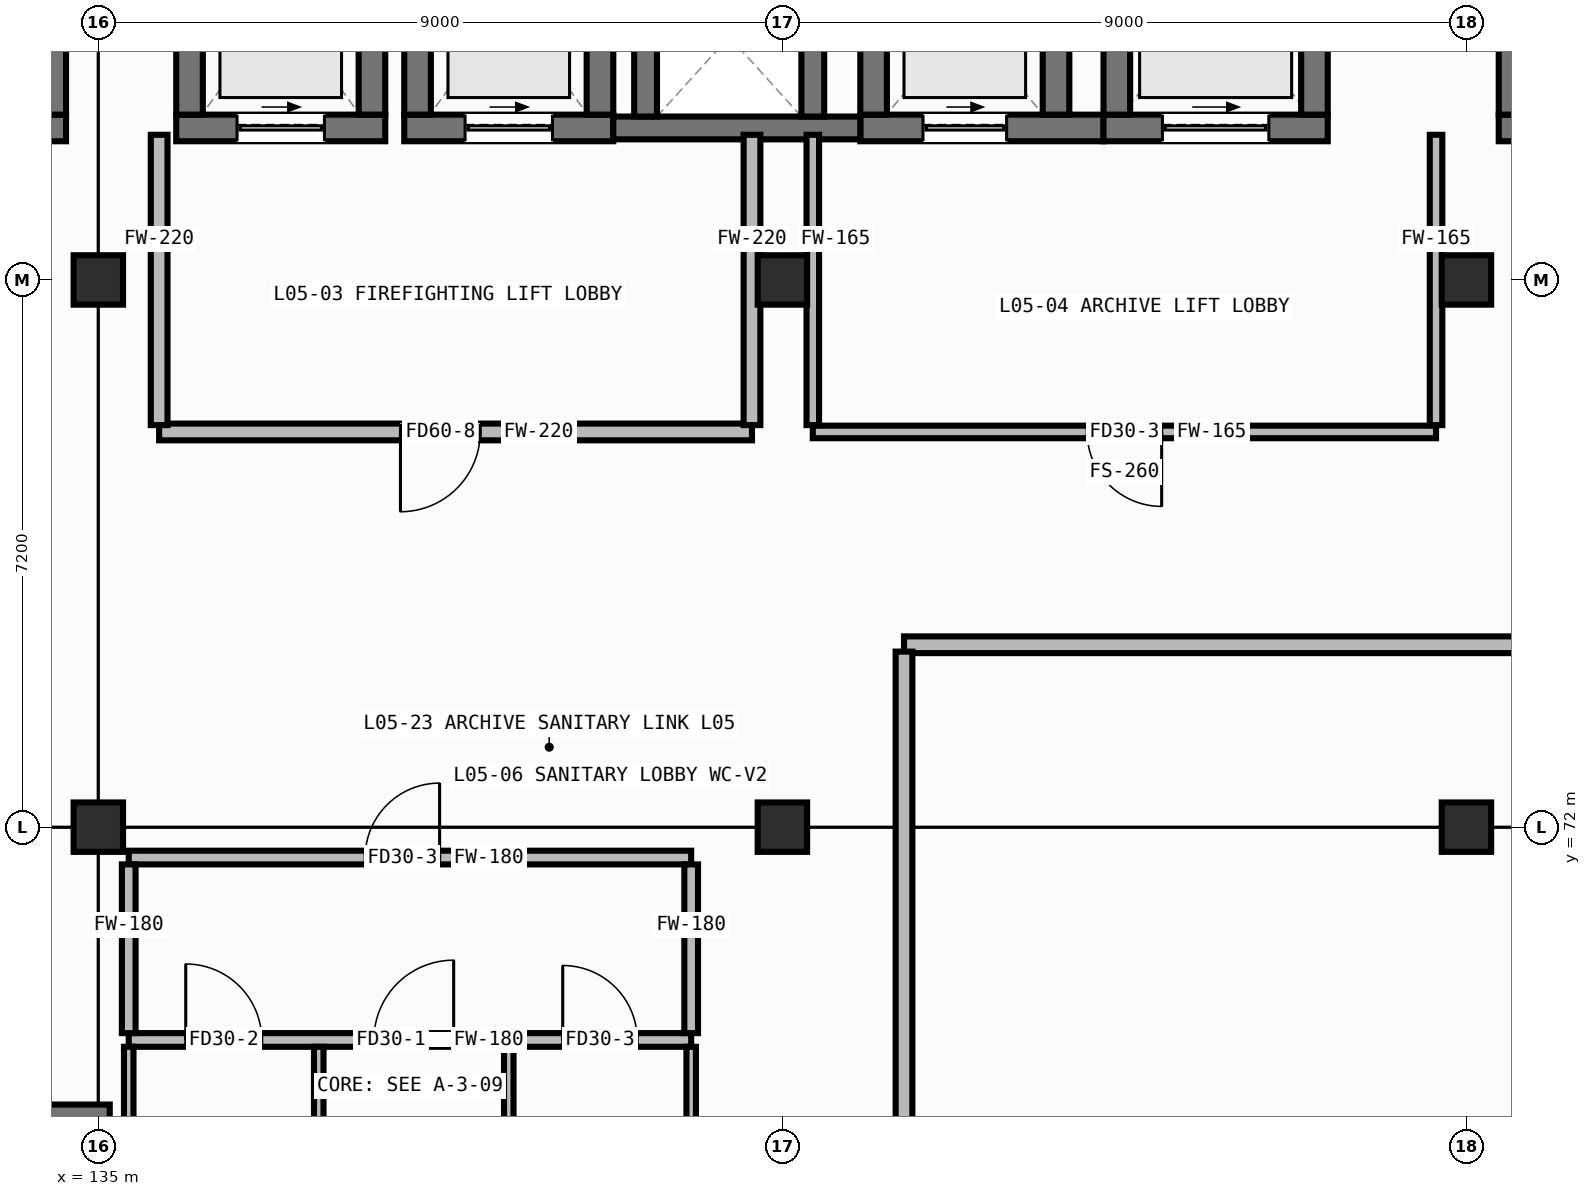
"""IFC4 building model, lengths in metres.
Left out: names, types, materials, properties, quantities, classifications, styles, units other than length and angle.
Written with IfcOpenShell. Run it as: python <this file> out.ifc"""

import sys

from ifc_helpers import new_model, si_unit, direction, frame, frame_2d, origin, origin_2d, place, context, subcontext, project, spatial, rectangle, hollow_rectangle, extrude, element, fill, save


model = new_model("IFC4")
c1 = context("Model", 3, precision=1e-05, world=origin(), true_north=direction((0.0, 1.0)))
c2 = subcontext(c1, "Body", "Model", "MODEL_VIEW")
j1 = project(units=[si_unit("LENGTHUNIT", "METRE"), si_unit("PLANEANGLEUNIT", "RADIAN")], contexts=[c1])
p1 = place(None, origin())
s1 = spatial("IfcSite", under=j1, at=p1, CompositionType="ELEMENT")
p2 = place(p1, origin())
s2 = spatial("IfcBuilding", under=s1, at=p2, CompositionType="ELEMENT")
p3 = place(p2, frame((0.0, 0.0, 17.0)))
s3 = spatial("IfcBuildingStorey", under=s2, at=p3, CompositionType="ELEMENT", Elevation=17.0)
for number, where, z_axis, x_axis in (
    (1, (135.0, 72.0, 0.0), (0.0, 0.0, 1.0), (1.0, 0.0, 0.0)),
    (2, (135.0, 79.2, 0.0), (0.0, 0.0, 1.0), (1.0, 0.0, 0.0)),
    (3, (144.0, 72.0, 0.0), (0.0, 0.0, 1.0), (1.0, 0.0, 0.0)),
    (4, (144.0, 79.2, 0.0), (0.0, 0.0, 1.0), (1.0, 0.0, 0.0)),
    (5, (153.0, 72.0, 0.0), (0.0, 0.0, 1.0), (1.0, 0.0, 0.0)),
    (6, (153.0, 79.2, 0.0), (0.0, 0.0, 1.0), (1.0, 0.0, 0.0)),
):
    element("IfcColumn", number, at=place(p3, frame(where, z_axis=z_axis, x_axis=x_axis)), inside=s3, PredefinedType="COLUMN", context=c2, shape_type="SweptSolid", body=[
        extrude(hollow_rectangle(XDim=0.65, YDim=0.65, WallThickness=0.025, at=origin_2d()), origin(), (0.0, 0.0, 1.0), 3.6),
    ])
p4 = place(p3, frame((126.425, 81.2, 0.0), z_axis=(0.0, 0.0, 1.0), x_axis=(1.0, 0.0, 0.0)))
e7 = element("IfcWall", 7, at=p4, inside=s3, PredefinedType="SHEAR", context=c2, shape_type="SweptSolid", body=[
    extrude(rectangle(XDim=8.15, YDim=0.35, at=frame_2d((4.075, 0.0))), origin(), (0.0, 0.0, 1.0), 3.34),
])
p5 = place(p4, frame((0.525, 0.0, 0.0)))
e8 = element("IfcOpeningElement", 8, at=p5, cuts=e7, PredefinedType="OPENING", context=c2, shape_type="SweptSolid", body=[
    extrude(rectangle(XDim=1.15, YDim=2.1, at=frame_2d((0.575, 1.05))), frame((0.0, 0.187, 0.0), z_axis=(0.0, -1.0, 0.0), x_axis=(1.0, 0.0, 0.0)), (0.0, 0.0, 1.0), 0.374),
])
p6 = place(p3, frame((134.4, 81.375, 0.0), z_axis=(0.0, 0.0, 1.0), x_axis=(0.0, 1.0, 0.0)))
e9 = element("IfcWall", 9, at=p6, inside=s3, PredefinedType="SHEAR", context=c2, shape_type="SweptSolid", body=[
    extrude(rectangle(XDim=3.55, YDim=0.35, at=frame_2d((1.775, 0.0))), origin(), (0.0, 0.0, 1.0), 3.34),
])
p7 = place(p3, frame((153.425, 81.2, 0.0), z_axis=(0.0, 0.0, 1.0), x_axis=(1.0, 0.0, 0.0)))
e10 = element("IfcWall", 10, at=p7, inside=s3, PredefinedType="SHEAR", context=c2, shape_type="SweptSolid", body=[
    extrude(rectangle(XDim=8.15, YDim=0.35, at=frame_2d((4.075, 0.0))), origin(), (0.0, 0.0, 1.0), 3.34),
])
p8 = place(p7, frame((0.525, 0.0, 0.0)))
e11 = element("IfcOpeningElement", 11, at=p8, cuts=e10, PredefinedType="OPENING", context=c2, shape_type="SweptSolid", body=[
    extrude(rectangle(XDim=1.15, YDim=2.1, at=frame_2d((0.575, 1.05))), frame((0.0, 0.187, 0.0), z_axis=(0.0, -1.0, 0.0), x_axis=(1.0, 0.0, 0.0)), (0.0, 0.0, 1.0), 0.374),
])
p9 = place(p3, frame((153.6, 81.375, 0.0), z_axis=(0.0, 0.0, 1.0), x_axis=(0.0, 1.0, 0.0)))
e12 = element("IfcWall", 12, at=p9, inside=s3, PredefinedType="SHEAR", context=c2, shape_type="SweptSolid", body=[
    extrude(rectangle(XDim=3.55, YDim=0.35, at=frame_2d((1.775, 0.0))), origin(), (0.0, 0.0, 1.0), 3.34),
])
p10 = place(p3, frame((136.025, 81.2, 0.0), z_axis=(0.0, 0.0, 1.0), x_axis=(1.0, 0.0, 0.0)))
e13 = element("IfcWall", 13, at=p10, inside=s3, PredefinedType="SHEAR", context=c2, shape_type="SweptSolid", body=[
    extrude(rectangle(XDim=2.75, YDim=0.35, at=frame_2d((1.375, 0.0))), origin(), (0.0, 0.0, 1.0), 3.34),
])
p11 = place(p10, frame((0.8, 0.0, 0.0)))
e14 = element("IfcOpeningElement", 14, at=p11, cuts=e13, PredefinedType="OPENING", context=c2, shape_type="SweptSolid", body=[
    extrude(rectangle(XDim=1.15, YDim=2.12, at=frame_2d((0.575, 1.06))), frame((0.0, 0.187, 0.0), z_axis=(0.0, -1.0, 0.0), x_axis=(1.0, 0.0, 0.0)), (0.0, 0.0, 1.0), 0.374),
])
for number, where, z_axis, x_axis in (
    (15, (136.2, 81.375, 0.0), (0.0, 0.0, 1.0), (0.0, 1.0, 0.0)),
    (16, (138.6, 81.375, 0.0), (0.0, 0.0, 1.0), (0.0, 1.0, 0.0)),
):
    element("IfcWall", number, at=place(p3, frame(where, z_axis=z_axis, x_axis=x_axis)), inside=s3, PredefinedType="SHEAR", context=c2, shape_type="SweptSolid", body=[
        extrude(rectangle(XDim=2.85, YDim=0.35, at=frame_2d((1.425, 0.0))), origin(), (0.0, 0.0, 1.0), 3.34),
    ])
p12 = place(p3, frame((139.025, 81.2, 0.0), z_axis=(0.0, 0.0, 1.0), x_axis=(1.0, 0.0, 0.0)))
e17 = element("IfcWall", 17, at=p12, inside=s3, PredefinedType="SHEAR", context=c2, shape_type="SweptSolid", body=[
    extrude(rectangle(XDim=2.75, YDim=0.35, at=frame_2d((1.375, 0.0))), origin(), (0.0, 0.0, 1.0), 3.34),
])
p13 = place(p12, frame((0.8, 0.0, 0.0)))
e18 = element("IfcOpeningElement", 18, at=p13, cuts=e17, PredefinedType="OPENING", context=c2, shape_type="SweptSolid", body=[
    extrude(rectangle(XDim=1.15, YDim=2.12, at=frame_2d((0.575, 1.06))), frame((0.0, 0.187, 0.0), z_axis=(0.0, -1.0, 0.0), x_axis=(1.0, 0.0, 0.0)), (0.0, 0.0, 1.0), 0.374),
])
for number, where, z_axis, x_axis in (
    (19, (139.2, 81.375, 0.0), (0.0, 0.0, 1.0), (0.0, 1.0, 0.0)),
    (20, (141.6, 81.375, 0.0), (0.0, 0.0, 1.0), (0.0, 1.0, 0.0)),
):
    element("IfcWall", number, at=place(p3, frame(where, z_axis=z_axis, x_axis=x_axis)), inside=s3, PredefinedType="SHEAR", context=c2, shape_type="SweptSolid", body=[
        extrude(rectangle(XDim=2.85, YDim=0.35, at=frame_2d((1.425, 0.0))), origin(), (0.0, 0.0, 1.0), 3.34),
    ])
p14 = place(p3, frame((145.025, 81.2, 0.0), z_axis=(0.0, 0.0, 1.0), x_axis=(1.0, 0.0, 0.0)))
e21 = element("IfcWall", 21, at=p14, inside=s3, PredefinedType="SHEAR", context=c2, shape_type="SweptSolid", body=[
    extrude(rectangle(XDim=3.2, YDim=0.35, at=frame_2d((1.6, 0.0))), origin(), (0.0, 0.0, 1.0), 3.34),
])
p15 = place(p14, frame((0.825, 0.0, 0.0)))
e22 = element("IfcOpeningElement", 22, at=p15, cuts=e21, PredefinedType="OPENING", context=c2, shape_type="SweptSolid", body=[
    extrude(rectangle(XDim=1.1, YDim=2.1, at=frame_2d((0.55, 1.05))), frame((0.0, 0.187, 0.0), z_axis=(0.0, -1.0, 0.0), x_axis=(1.0, 0.0, 0.0)), (0.0, 0.0, 1.0), 0.374),
])
for number, where, z_axis, x_axis in (
    (23, (145.2, 81.375, 0.0), (0.0, 0.0, 1.0), (0.0, 1.0, 0.0)),
    (24, (147.6, 81.375, 0.0), (0.0, 0.0, 1.0), (0.0, 1.0, 0.0)),
):
    element("IfcWall", number, at=place(p3, frame(where, z_axis=z_axis, x_axis=x_axis)), inside=s3, PredefinedType="SHEAR", context=c2, shape_type="SweptSolid", body=[
        extrude(rectangle(XDim=2.45, YDim=0.35, at=frame_2d((1.225, 0.0))), origin(), (0.0, 0.0, 1.0), 3.34),
    ])
p16 = place(p3, frame((148.225, 81.2, 0.0), z_axis=(0.0, 0.0, 1.0), x_axis=(1.0, 0.0, 0.0)))
e25 = element("IfcWall", 25, at=p16, inside=s3, PredefinedType="SHEAR", context=c2, shape_type="SweptSolid", body=[
    extrude(rectangle(XDim=2.95, YDim=0.35, at=frame_2d((1.475, 0.0))), origin(), (0.0, 0.0, 1.0), 3.34),
])
p17 = place(p16, frame((0.775, 0.0, 0.0)))
e26 = element("IfcOpeningElement", 26, at=p17, cuts=e25, PredefinedType="OPENING", context=c2, shape_type="SweptSolid", body=[
    extrude(rectangle(XDim=1.4, YDim=2.15, at=frame_2d((0.7, 1.075))), frame((0.0, 0.187, 0.0), z_axis=(0.0, -1.0, 0.0), x_axis=(1.0, 0.0, 0.0)), (0.0, 0.0, 1.0), 0.374),
])
for number, where, z_axis, x_axis in (
    (27, (148.4, 81.375, 0.0), (0.0, 0.0, 1.0), (0.0, 1.0, 0.0)),
    (28, (151.0, 81.375, 0.0), (0.0, 0.0, 1.0), (0.0, 1.0, 0.0)),
):
    element("IfcWall", number, at=place(p3, frame(where, z_axis=z_axis, x_axis=x_axis)), inside=s3, PredefinedType="SHEAR", context=c2, shape_type="SweptSolid", body=[
        extrude(rectangle(XDim=3.05, YDim=0.35, at=frame_2d((1.525, 0.0))), origin(), (0.0, 0.0, 1.0), 3.34),
    ])
p18 = place(p3, frame((141.775, 81.2, 0.0), z_axis=(0.0, 0.0, 1.0), x_axis=(1.0, 0.0, 0.0)))
e29 = element("IfcWall", 29, at=p18, inside=s3, PredefinedType="SHEAR", context=c2, shape_type="SweptSolid", body=[
    extrude(rectangle(XDim=3.25, YDim=0.3, at=frame_2d((1.625, 0.0))), origin(), (0.0, 0.0, 1.0), 3.34),
])
for number, where, z_axis, x_axis in (
    (30, (142.2, 81.35, 0.0), (0.0, 0.0, 1.0), (0.0, 1.0, 0.0)),
    (31, (144.4, 81.35, 0.0), (0.0, 0.0, 1.0), (0.0, 1.0, 0.0)),
    (32, (133.05, 68.2, 0.0), (0.0, 0.0, 1.0), (1.0, 0.0, 0.0)),
):
    element("IfcWall", number, at=place(p3, frame(where, z_axis=z_axis, x_axis=x_axis)), inside=s3, PredefinedType="SHEAR", context=c2, shape_type="SweptSolid", body=[
        extrude(rectangle(XDim=2.1, YDim=0.3, at=frame_2d((1.05, 0.0))), origin(), (0.0, 0.0, 1.0), 3.34),
    ])
p19 = place(p3, frame((135.8, 77.2, 0.0), z_axis=(0.0, 0.0, 1.0), x_axis=(1.0, 0.0, 0.0)))
e33 = element("IfcWall", 33, at=p19, inside=s3, PredefinedType="PARTITIONING", context=c2, shape_type="SweptSolid", body=[
    extrude(rectangle(XDim=7.8, YDim=0.22, at=frame_2d((3.9, 0.0))), origin(), (0.0, 0.0, 1.0), 3.34),
])
p20 = place(p19, frame((3.175, 0.0, 0.0)))
e34 = element("IfcOpeningElement", 34, at=p20, cuts=e33, PredefinedType="OPENING", context=c2, shape_type="SweptSolid", body=[
    extrude(rectangle(XDim=1.05, YDim=2.02, at=frame_2d((0.525, 1.01))), frame((0.0, 0.122, 0.0), z_axis=(0.0, -1.0, 0.0), x_axis=(1.0, 0.0, 0.0)), (0.0, 0.0, 1.0), 0.244),
])
for number, where, z_axis, x_axis in (
    (35, (135.8, 77.29, 0.0), (0.0, 0.0, 1.0), (0.0, 1.0, 0.0)),
    (36, (143.6, 77.29, 0.0), (0.0, 0.0, 1.0), (0.0, 1.0, 0.0)),
):
    element("IfcWall", number, at=place(p3, frame(where, z_axis=z_axis, x_axis=x_axis)), inside=s3, PredefinedType="PARTITIONING", context=c2, shape_type="SweptSolid", body=[
        extrude(rectangle(XDim=3.82, YDim=0.22, at=frame_2d((1.91, 0.0))), origin(), (0.0, 0.0, 1.0), 3.34),
    ])
p21 = place(p3, frame((144.4, 77.2, 0.0), z_axis=(0.0, 0.0, 1.0), x_axis=(1.0, 0.0, 0.0)))
e37 = element("IfcWall", 37, at=p21, inside=s3, PredefinedType="PARTITIONING", context=c2, shape_type="SweptSolid", body=[
    extrude(rectangle(XDim=8.2, YDim=0.165, at=frame_2d((4.1, 0.0))), origin(), (0.0, 0.0, 1.0), 3.34),
])
p22 = place(p21, frame((3.61, 0.0, 0.0)))
e38 = element("IfcOpeningElement", 38, at=p22, cuts=e37, PredefinedType="OPENING", context=c2, shape_type="SweptSolid", body=[
    extrude(rectangle(XDim=0.98, YDim=2.02, at=frame_2d((0.49, 1.01))), frame((0.0, 0.094, 0.0), z_axis=(0.0, -1.0, 0.0), x_axis=(1.0, 0.0, 0.0)), (0.0, 0.0, 1.0), 0.189),
])
for number, where, z_axis, x_axis in (
    (39, (144.4, 77.29, 0.0), (0.0, 0.0, 1.0), (0.0, 1.0, 0.0)),
    (40, (152.6, 77.29, 0.0), (0.0, 0.0, 1.0), (0.0, 1.0, 0.0)),
):
    element("IfcWall", number, at=place(p3, frame(where, z_axis=z_axis, x_axis=x_axis)), inside=s3, PredefinedType="PARTITIONING", context=c2, shape_type="SweptSolid", body=[
        extrude(rectangle(XDim=3.82, YDim=0.165, at=frame_2d((1.91, 0.0))), origin(), (0.0, 0.0, 1.0), 3.34),
    ])
p23 = place(p3, frame((135.4, 69.2, 0.0), z_axis=(0.0, 0.0, 1.0), x_axis=(1.0, 0.0, 0.0)))
e41 = element("IfcWall", 41, at=p23, inside=s3, PredefinedType="PARTITIONING", context=c2, shape_type="SweptSolid", body=[
    extrude(rectangle(XDim=7.4, YDim=0.18, at=frame_2d((3.7, 0.0))), origin(), (0.0, 0.0, 1.0), 3.34),
])
p24 = place(p23, frame((0.75, 0.0, 0.0)))
e42 = element("IfcOpeningElement", 42, at=p24, cuts=e41, PredefinedType="OPENING", context=c2, shape_type="SweptSolid", body=[
    extrude(rectangle(XDim=1.0, YDim=2.08, at=frame_2d((0.5, 1.04))), frame((0.0, 0.102, 0.0), z_axis=(0.0, -1.0, 0.0), x_axis=(1.0, 0.0, 0.0)), (0.0, 0.0, 1.0), 0.204),
])
p25 = place(p23, frame((3.225, 0.0, 0.0)))
e43 = element("IfcOpeningElement", 43, at=p25, cuts=e41, PredefinedType="OPENING", context=c2, shape_type="SweptSolid", body=[
    extrude(rectangle(XDim=1.05, YDim=2.1, at=frame_2d((0.525, 1.05))), frame((0.0, 0.102, 0.0), z_axis=(0.0, -1.0, 0.0), x_axis=(1.0, 0.0, 0.0)), (0.0, 0.0, 1.0), 0.204),
])
p26 = place(p23, frame((5.71, 0.0, 0.0)))
e44 = element("IfcOpeningElement", 44, at=p26, cuts=e41, PredefinedType="OPENING", context=c2, shape_type="SweptSolid", body=[
    extrude(rectangle(XDim=0.98, YDim=2.02, at=frame_2d((0.49, 1.01))), frame((0.0, 0.102, 0.0), z_axis=(0.0, -1.0, 0.0), x_axis=(1.0, 0.0, 0.0)), (0.0, 0.0, 1.0), 0.204),
])
p27 = place(p3, frame((135.4, 71.6, 0.0), z_axis=(0.0, 0.0, 1.0), x_axis=(1.0, 0.0, 0.0)))
e45 = element("IfcWall", 45, at=p27, inside=s3, PredefinedType="PARTITIONING", context=c2, shape_type="SweptSolid", body=[
    extrude(rectangle(XDim=7.4, YDim=0.18, at=frame_2d((3.7, 0.0))), origin(), (0.0, 0.0, 1.0), 3.34),
])
p28 = place(p27, frame((3.11, 0.0, 0.0)))
e46 = element("IfcOpeningElement", 46, at=p28, cuts=e45, PredefinedType="OPENING", context=c2, shape_type="SweptSolid", body=[
    extrude(rectangle(XDim=0.98, YDim=2.02, at=frame_2d((0.49, 1.01))), frame((0.0, 0.102, 0.0), z_axis=(0.0, -1.0, 0.0), x_axis=(1.0, 0.0, 0.0)), (0.0, 0.0, 1.0), 0.204),
])
for number, where, z_axis, x_axis in (
    (47, (135.4, 69.29, 0.0), (0.0, 0.0, 1.0), (0.0, 1.0, 0.0)),
    (48, (142.8, 69.29, 0.0), (0.0, 0.0, 1.0), (0.0, 1.0, 0.0)),
):
    element("IfcWall", number, at=place(p3, frame(where, z_axis=z_axis, x_axis=x_axis)), inside=s3, PredefinedType="PARTITIONING", context=c2, shape_type="SweptSolid", body=[
        extrude(rectangle(XDim=2.22, YDim=0.18, at=frame_2d((1.11, 0.0))), origin(), (0.0, 0.0, 1.0), 3.34),
    ])
for number, where, z_axis, x_axis in (
    (49, (135.4, 65.69, 0.0), (0.0, 0.0, 1.0), (0.0, 1.0, 0.0)),
    (50, (137.9, 65.69, 0.0), (0.0, 0.0, 1.0), (0.0, 1.0, 0.0)),
    (51, (140.4, 65.69, 0.0), (0.0, 0.0, 1.0), (0.0, 1.0, 0.0)),
    (52, (142.8, 65.69, 0.0), (0.0, 0.0, 1.0), (0.0, 1.0, 0.0)),
):
    element("IfcWall", number, at=place(p3, frame(where, z_axis=z_axis, x_axis=x_axis)), inside=s3, PredefinedType="PARTITIONING", context=c2, shape_type="SweptSolid", body=[
        extrude(rectangle(XDim=3.42, YDim=0.125, at=frame_2d((1.71, 0.0))), origin(), (0.0, 0.0, 1.0), 3.34),
    ])
p29 = place(p3, frame((145.6, 74.4, 0.0), z_axis=(0.0, 0.0, 1.0), x_axis=(1.0, 0.0, 0.0)))
e53 = element("IfcWall", 53, at=p29, inside=s3, PredefinedType="PARTITIONING", context=c2, shape_type="SweptSolid", body=[
    extrude(rectangle(XDim=16.255, YDim=0.22, at=frame_2d((8.127, 0.0))), origin(), (0.0, 0.0, 1.0), 3.34),
])
p30 = place(p3, frame((145.6, 50.435, 0.0), z_axis=(0.0, 0.0, 1.0), x_axis=(0.0, 1.0, 0.0)))
e54 = element("IfcWall", 54, at=p30, inside=s3, PredefinedType="PARTITIONING", context=c2, shape_type="SweptSolid", body=[
    extrude(rectangle(XDim=23.875, YDim=0.22, at=frame_2d((11.938, 0.0))), origin(), (0.0, 0.0, 1.0), 3.34),
])
p31 = place(p30, frame((15.165, 0.0, 0.0)))
e55 = element("IfcOpeningElement", 55, at=p31, cuts=e54, PredefinedType="OPENING", context=c2, shape_type="SweptSolid", body=[
    extrude(rectangle(XDim=1.6, YDim=2.12, at=frame_2d((0.8, 1.06))), frame((0.0, 0.122, 0.0), z_axis=(0.0, -1.0, 0.0), x_axis=(1.0, 0.0, 0.0)), (0.0, 0.0, 1.0), 0.244),
])
p32 = place(p11, origin())
e56 = element("IfcDoor", 56, at=p32, inside=s3, OperationType="SLIDING_TO_LEFT", PredefinedType="DOOR", context=c2, shape_type="SweptSolid", body=[
    extrude(rectangle(XDim=1.15, YDim=2.12, at=frame_2d((0.575, 1.06))), frame((0.0, 0.025, 0.0), z_axis=(0.0, -1.0, 0.0), x_axis=(1.0, 0.0, 0.0)), (0.0, 0.0, 1.0), 0.05),
])
fill(e14, e56)
p33 = place(p13, origin())
e57 = element("IfcDoor", 57, at=p33, inside=s3, OperationType="SLIDING_TO_LEFT", PredefinedType="DOOR", context=c2, shape_type="SweptSolid", body=[
    extrude(rectangle(XDim=1.15, YDim=2.12, at=frame_2d((0.575, 1.06))), frame((0.0, 0.025, 0.0), z_axis=(0.0, -1.0, 0.0), x_axis=(1.0, 0.0, 0.0)), (0.0, 0.0, 1.0), 0.05),
])
fill(e18, e57)
p34 = place(p15, origin())
e58 = element("IfcDoor", 58, at=p34, inside=s3, OperationType="SLIDING_TO_LEFT", PredefinedType="DOOR", context=c2, shape_type="SweptSolid", body=[
    extrude(rectangle(XDim=1.1, YDim=2.1, at=frame_2d((0.55, 1.05))), frame((0.0, 0.025, 0.0), z_axis=(0.0, -1.0, 0.0), x_axis=(1.0, 0.0, 0.0)), (0.0, 0.0, 1.0), 0.05),
])
fill(e22, e58)
p35 = place(p17, origin())
e59 = element("IfcDoor", 59, at=p35, inside=s3, OperationType="SLIDING_TO_LEFT", PredefinedType="DOOR", context=c2, shape_type="SweptSolid", body=[
    extrude(rectangle(XDim=1.4, YDim=2.15, at=frame_2d((0.7, 1.075))), frame((0.0, 0.025, 0.0), z_axis=(0.0, -1.0, 0.0), x_axis=(1.0, 0.0, 0.0)), (0.0, 0.0, 1.0), 0.05),
])
fill(e26, e59)
p36 = place(p20, frame((1.05, 0.0, 0.0), z_axis=(0.0, 0.0, 1.0), x_axis=(-1.0, 0.0, 0.0)))
e60 = element("IfcDoor", 60, at=p36, inside=s3, OperationType="SINGLE_SWING_RIGHT", PredefinedType="DOOR", context=c2, shape_type="SweptSolid", body=[
    extrude(rectangle(XDim=1.05, YDim=2.02, at=frame_2d((0.525, 1.01))), frame((0.0, 0.025, 0.0), z_axis=(0.0, -1.0, 0.0), x_axis=(1.0, 0.0, 0.0)), (0.0, 0.0, 1.0), 0.05),
])
fill(e34, e60)
p37 = place(p22, frame((0.98, 0.0, 0.0), z_axis=(0.0, 0.0, 1.0), x_axis=(-1.0, 0.0, 0.0)))
e61 = element("IfcDoor", 61, at=p37, inside=s3, OperationType="SINGLE_SWING_LEFT", PredefinedType="DOOR", context=c2, shape_type="SweptSolid", body=[
    extrude(rectangle(XDim=0.98, YDim=2.02, at=frame_2d((0.49, 1.01))), frame((0.0, 0.025, 0.0), z_axis=(0.0, -1.0, 0.0), x_axis=(1.0, 0.0, 0.0)), (0.0, 0.0, 1.0), 0.05),
])
fill(e38, e61)
p38 = place(p28, origin())
e62 = element("IfcDoor", 62, at=p38, inside=s3, OperationType="SINGLE_SWING_RIGHT", PredefinedType="DOOR", context=c2, shape_type="SweptSolid", body=[
    extrude(rectangle(XDim=0.98, YDim=2.02, at=frame_2d((0.49, 1.01))), frame((0.0, 0.025, 0.0), z_axis=(0.0, -1.0, 0.0), x_axis=(1.0, 0.0, 0.0)), (0.0, 0.0, 1.0), 0.05),
])
fill(e46, e62)
p39 = place(p24, origin())
e63 = element("IfcDoor", 63, at=p39, inside=s3, OperationType="SINGLE_SWING_LEFT", PredefinedType="DOOR", context=c2, shape_type="SweptSolid", body=[
    extrude(rectangle(XDim=1.0, YDim=2.08, at=frame_2d((0.5, 1.04))), frame((0.0, 0.025, 0.0), z_axis=(0.0, -1.0, 0.0), x_axis=(1.0, 0.0, 0.0)), (0.0, 0.0, 1.0), 0.05),
])
fill(e42, e63)
p40 = place(p25, origin())
e64 = element("IfcDoor", 64, at=p40, inside=s3, OperationType="SINGLE_SWING_RIGHT", PredefinedType="DOOR", context=c2, shape_type="SweptSolid", body=[
    extrude(rectangle(XDim=1.05, YDim=2.1, at=frame_2d((0.525, 1.05))), frame((0.0, 0.025, 0.0), z_axis=(0.0, -1.0, 0.0), x_axis=(1.0, 0.0, 0.0)), (0.0, 0.0, 1.0), 0.05),
])
fill(e43, e64)
p41 = place(p26, origin())
e65 = element("IfcDoor", 65, at=p41, inside=s3, OperationType="SINGLE_SWING_LEFT", PredefinedType="DOOR", context=c2, shape_type="SweptSolid", body=[
    extrude(rectangle(XDim=0.98, YDim=2.02, at=frame_2d((0.49, 1.01))), frame((0.0, 0.025, 0.0), z_axis=(0.0, -1.0, 0.0), x_axis=(1.0, 0.0, 0.0)), (0.0, 0.0, 1.0), 0.05),
])
fill(e44, e65)
save(model, sys.argv[1])
